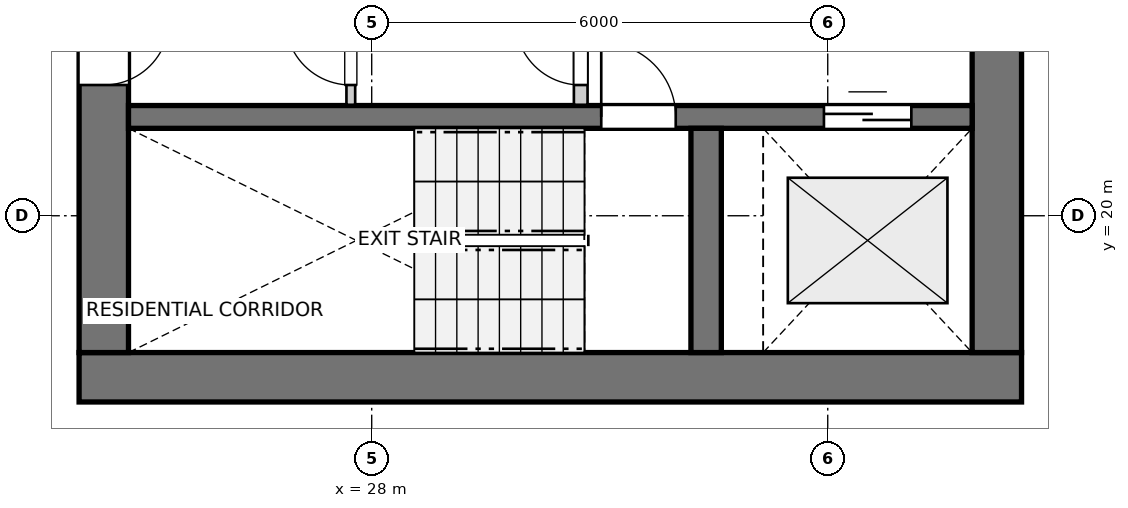
"""IFC4 building model, lengths in metres.
Left out: names, types, materials, properties, quantities, classifications, styles, units other than length and angle.
Written with IfcOpenShell. Run it as: python <this file> out.ifc"""

import sys

from ifc_helpers import new_model, si_unit, direction, frame, frame_2d, origin, place, context, subcontext, project, spatial, rectangle, extrude, source, transform, mapped, element, fill, save


model = new_model("IFC4")
c1 = context("Model", 3, precision=1e-05, world=origin(), true_north=direction((0.0, 1.0)))
c2 = subcontext(c1, "Body", "Model", "MODEL_VIEW")
j1 = project(units=[si_unit("LENGTHUNIT", "METRE"), si_unit("PLANEANGLEUNIT", "RADIAN")], contexts=[c1])
p1 = place(None, origin())
s1 = spatial("IfcSite", under=j1, at=p1, CompositionType="ELEMENT")
p2 = place(p1, origin())
s2 = spatial("IfcBuilding", under=s1, at=p2, CompositionType="ELEMENT")
p3 = place(p2, frame((0.0, 0.0, 83.2)))
s3 = spatial("IfcBuildingStorey", under=s2, at=p3, CompositionType="ELEMENT", Elevation=83.2)
p4 = place(p3, frame((24.15, 17.875, 0.0), z_axis=(0.0, 0.0, 1.0), x_axis=(1.0, 0.0, 0.0)))
e1 = element("IfcWall", 1, at=p4, inside=s3, PredefinedType="SHEAR", context=c2, shape_type="SweptSolid", body=[
    extrude(rectangle(XDim=12.4, YDim=0.65, at=frame_2d((6.2, 0.0))), origin(), (0.0, 0.0, 1.0), 2.935),
])
p5 = place(p3, frame((24.475, 33.8, 0.0), z_axis=(0.0, 0.0, 1.0), x_axis=(0.0, -1.0, 0.0)))
e2 = element("IfcWall", 2, at=p5, inside=s3, PredefinedType="SHEAR", context=c2, shape_type="SweptSolid", body=[
    extrude(rectangle(XDim=15.6, YDim=0.65, at=frame_2d((7.8, 0.0))), origin(), (0.0, 0.0, 1.0), 2.935),
])
p6 = place(p5, frame((7.05, 0.0, 0.0)))
e3 = element("IfcOpeningElement", 3, at=p6, cuts=e2, PredefinedType="OPENING", context=c2, shape_type="SweptSolid", body=[
    extrude(rectangle(XDim=1.5, YDim=2.15, at=frame_2d((0.75, 1.075))), frame((0.0, 0.335, 0.0), z_axis=(0.0, -1.0, 0.0), x_axis=(1.0, 0.0, 0.0)), (0.0, 0.0, 1.0), 0.67),
])
p7 = place(p5, frame((3.52, 0.0, 0.0)))
e4 = element("IfcOpeningElement", 4, at=p7, cuts=e2, PredefinedType="OPENING", context=c2, shape_type="SweptSolid", body=[
    extrude(rectangle(XDim=0.86, YDim=2.05, at=frame_2d((0.43, 1.025))), frame((0.0, 0.335, 0.0), z_axis=(0.0, -1.0, 0.0), x_axis=(1.0, 0.0, 0.0)), (0.0, 0.0, 1.0), 0.67),
])
p8 = place(p5, frame((11.22, 0.0, 0.0)))
e5 = element("IfcOpeningElement", 5, at=p8, cuts=e2, PredefinedType="OPENING", context=c2, shape_type="SweptSolid", body=[
    extrude(rectangle(XDim=0.86, YDim=2.05, at=frame_2d((0.43, 1.025))), frame((0.0, 0.335, 0.0), z_axis=(0.0, -1.0, 0.0), x_axis=(1.0, 0.0, 0.0)), (0.0, 0.0, 1.0), 0.67),
])
p9 = place(p3, frame((36.225, 18.2, 0.0), z_axis=(0.0, 0.0, 1.0), x_axis=(0.0, 1.0, 0.0)))
e6 = element("IfcWall", 6, at=p9, inside=s3, PredefinedType="SHEAR", context=c2, shape_type="SweptSolid", body=[
    extrude(rectangle(XDim=15.6, YDim=0.65, at=frame_2d((7.8, 0.0))), origin(), (0.0, 0.0, 1.0), 2.935),
])
p10 = place(p9, frame((4.25, 0.0, 0.0)))
e7 = element("IfcOpeningElement", 7, at=p10, cuts=e6, PredefinedType="OPENING", context=c2, shape_type="SweptSolid", body=[
    extrude(rectangle(XDim=1.1, YDim=2.15, at=frame_2d((0.55, 1.075))), frame((0.0, 0.335, 0.0), z_axis=(0.0, -1.0, 0.0), x_axis=(1.0, 0.0, 0.0)), (0.0, 0.0, 1.0), 0.67),
])
p11 = place(p9, frame((10.25, 0.0, 0.0)))
e8 = element("IfcOpeningElement", 8, at=p11, cuts=e6, PredefinedType="OPENING", context=c2, shape_type="SweptSolid", body=[
    extrude(rectangle(XDim=1.1, YDim=2.15, at=frame_2d((0.55, 1.075))), frame((0.0, 0.335, 0.0), z_axis=(0.0, -1.0, 0.0), x_axis=(1.0, 0.0, 0.0)), (0.0, 0.0, 1.0), 0.67),
])
p12 = place(p3, frame((24.8, 21.3, 0.0), z_axis=(0.0, 0.0, 1.0), x_axis=(1.0, 0.0, 0.0)))
e9 = element("IfcWall", 9, at=p12, inside=s3, PredefinedType="SHEAR", context=c2, shape_type="SweptSolid", body=[
    extrude(rectangle(XDim=11.1, YDim=0.3, at=frame_2d((5.55, 0.0))), origin(), (0.0, 0.0, 1.0), 2.935),
])
p13 = place(p12, frame((6.22, 0.0, 0.0)))
e10 = element("IfcOpeningElement", 10, at=p13, cuts=e9, PredefinedType="OPENING", context=c2, shape_type="SweptSolid", body=[
    extrude(rectangle(XDim=0.98, YDim=2.15, at=frame_2d((0.49, 1.075))), frame((0.0, 0.16, 0.0), z_axis=(0.0, -1.0, 0.0), x_axis=(1.0, 0.0, 0.0)), (0.0, 0.0, 1.0), 0.32),
])
p14 = place(p12, frame((9.15, 0.0, 0.0)))
e11 = element("IfcOpeningElement", 11, at=p14, cuts=e9, PredefinedType="OPENING", context=c2, shape_type="SweptSolid", body=[
    extrude(rectangle(XDim=1.15, YDim=2.15, at=frame_2d((0.575, 1.075))), frame((0.0, 0.16, 0.0), z_axis=(0.0, -1.0, 0.0), x_axis=(1.0, 0.0, 0.0)), (0.0, 0.0, 1.0), 0.32),
])
p15 = place(p3, frame((32.4, 18.2, 0.0), z_axis=(0.0, 0.0, 1.0), x_axis=(0.0, 1.0, 0.0)))
e12 = element("IfcWall", 12, at=p15, inside=s3, PredefinedType="SHEAR", context=c2, shape_type="SweptSolid", body=[
    extrude(rectangle(XDim=2.95, YDim=0.4, at=frame_2d((1.475, 0.0))), origin(), (0.0, 0.0, 1.0), 2.935),
])
p16 = place(p3, frame((30.75, 21.46, 0.0), z_axis=(0.0, 0.0, 1.0), x_axis=(0.0, 1.0, 0.0)))
e13 = element("IfcWall", 13, at=p16, inside=s3, PredefinedType="PARTITIONING", context=c2, shape_type="SweptSolid", body=[
    extrude(rectangle(XDim=3.11, YDim=0.18, at=frame_2d((1.555, 0.0))), origin(), (0.0, 0.0, 1.0), 2.935),
])
p17 = place(p16, frame((0.26, 0.0, 0.0)))
e14 = element("IfcOpeningElement", 14, at=p17, cuts=e13, PredefinedType="OPENING", context=c2, shape_type="SweptSolid", body=[
    extrude(rectangle(XDim=0.86, YDim=2.05, at=frame_2d((0.43, 1.025))), frame((0.0, 0.1, 0.0), z_axis=(0.0, -1.0, 0.0), x_axis=(1.0, 0.0, 0.0)), (0.0, 0.0, 1.0), 0.2),
])
p18 = place(p3, frame((27.725, 21.46, 0.0), z_axis=(0.0, 0.0, 1.0), x_axis=(0.0, 1.0, 0.0)))
e15 = element("IfcWall", 15, at=p18, inside=s3, PredefinedType="PARTITIONING", context=c2, shape_type="SweptSolid", body=[
    extrude(rectangle(XDim=1.38, YDim=0.115, at=frame_2d((0.69, 0.0))), origin(), (0.0, 0.0, 1.0), 2.935),
])
p19 = place(p18, frame((0.26, 0.0, 0.0)))
e16 = element("IfcOpeningElement", 16, at=p19, cuts=e15, PredefinedType="OPENING", context=c2, shape_type="SweptSolid", body=[
    extrude(rectangle(XDim=0.86, YDim=2.05, at=frame_2d((0.43, 1.025))), frame((0.0, 0.067, 0.0), z_axis=(0.0, -1.0, 0.0), x_axis=(1.0, 0.0, 0.0)), (0.0, 0.0, 1.0), 0.135),
])
m1 = source(origin(), c2, "Body", "SweptSolid", [
    extrude(rectangle(XDim=0.98, YDim=2.15, at=frame_2d((0.49, 1.075))), frame((0.0, 0.025, 0.0), z_axis=(0.0, -1.0, 0.0), x_axis=(1.0, 0.0, 0.0)), (0.0, 0.0, 1.0), 0.05),
])
p20 = place(p13, origin())
e17 = element("IfcDoor", 17, at=p20, inside=s3, OperationType="SINGLE_SWING_LEFT", PredefinedType="DOOR", context=c2, shape_type="MappedRepresentation", body=[
    mapped(m1, transform((0.0, 0.0, 0.0), x_axis=(1.0, 0.0, 0.0), y_axis=(0.0, 1.0, 0.0), z_axis=(0.0, 0.0, 1.0), scale=1.0)),
])
fill(e10, e17)
m2 = source(origin(), c2, "Body", "SweptSolid", [
    extrude(rectangle(XDim=1.15, YDim=2.15, at=frame_2d((0.575, 1.075))), frame((0.0, 0.025, 0.0), z_axis=(0.0, -1.0, 0.0), x_axis=(1.0, 0.0, 0.0)), (0.0, 0.0, 1.0), 0.05),
])
p21 = place(p14, origin())
e18 = element("IfcDoor", 18, at=p21, inside=s3, OperationType="DOUBLE_DOOR_SLIDING", PredefinedType="DOOR", context=c2, shape_type="MappedRepresentation", body=[
    mapped(m2, transform((0.0, 0.0, 0.0), x_axis=(1.0, 0.0, 0.0), y_axis=(0.0, 1.0, 0.0), z_axis=(0.0, 0.0, 1.0), scale=1.0)),
])
fill(e11, e18)
m3 = source(origin(), c2, "Body", "SweptSolid", [
    extrude(rectangle(XDim=0.86, YDim=2.05, at=frame_2d((0.43, 1.025))), frame((0.0, 0.025, 0.0), z_axis=(0.0, -1.0, 0.0), x_axis=(1.0, 0.0, 0.0)), (0.0, 0.0, 1.0), 0.05),
])
p22 = place(p8, origin())
e19 = element("IfcDoor", 19, at=p22, inside=s3, OperationType="SINGLE_SWING_LEFT", PredefinedType="DOOR", context=c2, shape_type="MappedRepresentation", body=[
    mapped(m3, transform((0.0, 0.0, 0.0), x_axis=(1.0, 0.0, 0.0), y_axis=(0.0, 1.0, 0.0), z_axis=(0.0, 0.0, 1.0), scale=1.0)),
])
fill(e5, e19)
p23 = place(p17, origin())
e20 = element("IfcDoor", 20, at=p23, inside=s3, OperationType="SINGLE_SWING_RIGHT", PredefinedType="DOOR", context=c2, shape_type="MappedRepresentation", body=[
    mapped(m3, transform((0.0, 0.0, 0.0), x_axis=(1.0, 0.0, 0.0), y_axis=(0.0, 1.0, 0.0), z_axis=(0.0, 0.0, 1.0), scale=1.0)),
])
fill(e14, e20)
p24 = place(p19, origin())
e21 = element("IfcDoor", 21, at=p24, inside=s3, OperationType="SINGLE_SWING_RIGHT", PredefinedType="DOOR", context=c2, shape_type="MappedRepresentation", body=[
    mapped(m3, transform((0.0, 0.0, 0.0), x_axis=(1.0, 0.0, 0.0), y_axis=(0.0, 1.0, 0.0), z_axis=(0.0, 0.0, 1.0), scale=1.0)),
])
fill(e16, e21)
save(model, sys.argv[1])
